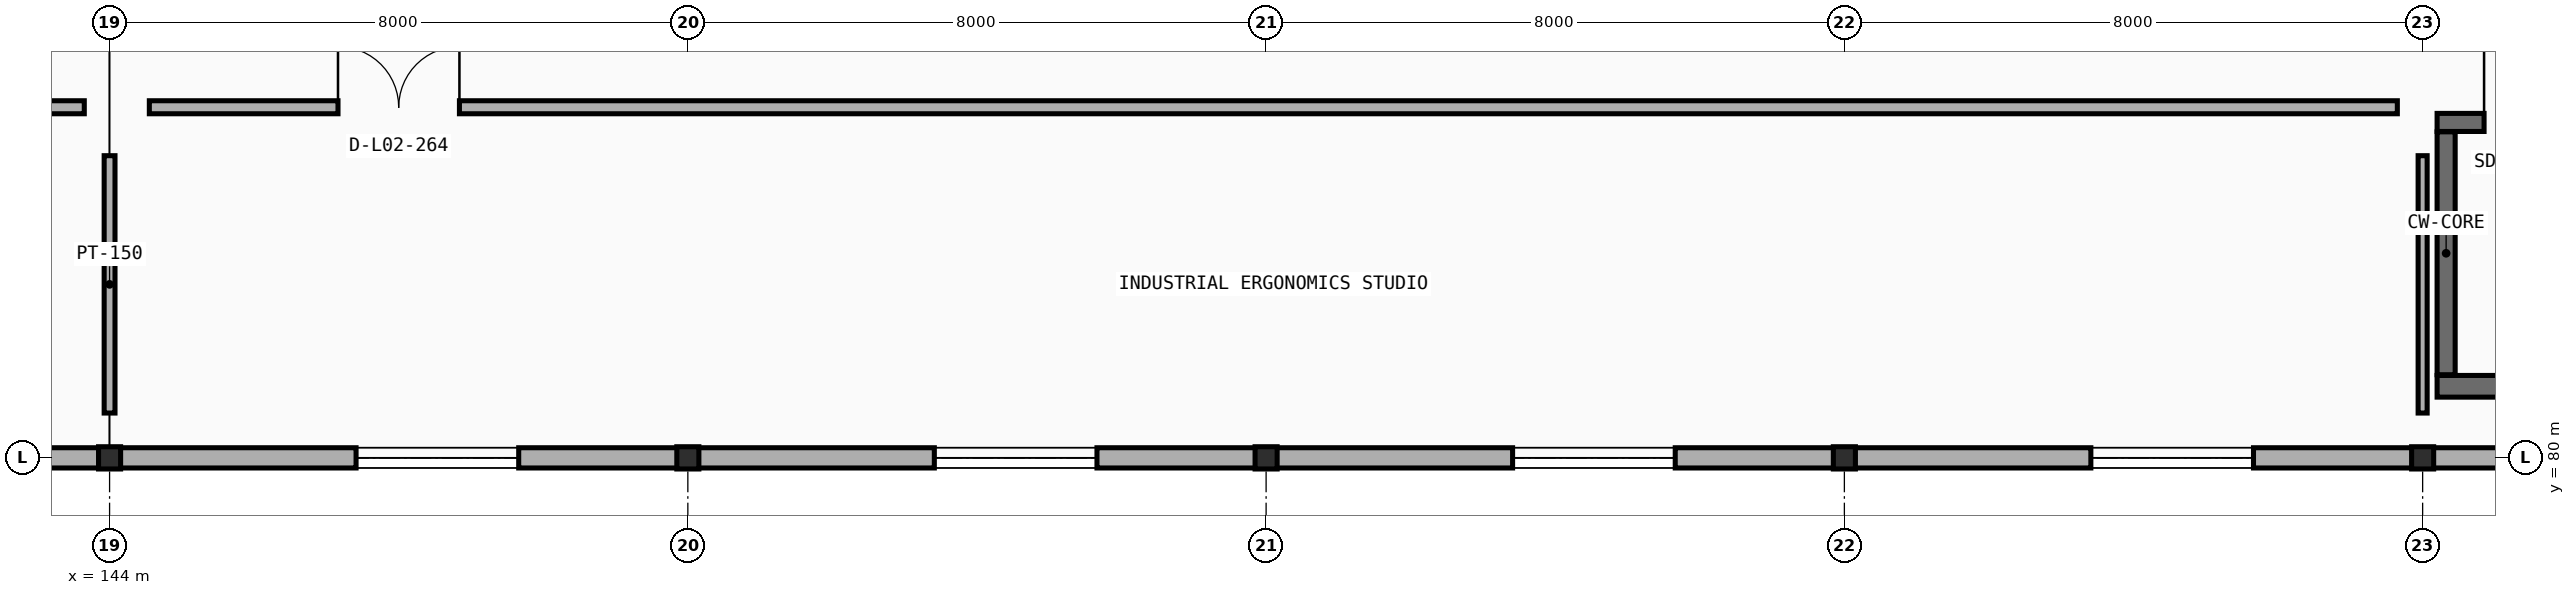
"""IFC4 building model, lengths in metres.
Left out: names, types, materials, properties, quantities, classifications, styles, units other than length and angle.
Written with IfcOpenShell. Run it as: python <this file> out.ifc"""

import sys

from ifc_helpers import new_model, si_unit, direction, frame, frame_2d, origin, origin_2d, place, context, subcontext, project, spatial, rectangle, i_section, extrude, element, fill, save


model = new_model("IFC4")
c1 = context("Model", 3, precision=1e-05, world=origin(), true_north=direction((0.0, 1.0)))
c2 = subcontext(c1, "Body", "Model", "MODEL_VIEW")
j1 = project(units=[si_unit("LENGTHUNIT", "METRE"), si_unit("PLANEANGLEUNIT", "RADIAN")], contexts=[c1])
p1 = place(None, origin())
s1 = spatial("IfcSite", under=j1, at=p1, CompositionType="ELEMENT")
p2 = place(p1, origin())
s2 = spatial("IfcBuilding", under=s1, at=p2, CompositionType="ELEMENT")
p3 = place(p2, frame((0.0, 0.0, 4.8)))
s3 = spatial("IfcBuildingStorey", under=s2, at=p3, CompositionType="ELEMENT", Elevation=4.8)
for number, where, z_axis, x_axis in (
    (1, (144.0, 80.0, 0.0), (0.0, 0.0, 1.0), (1.0, 0.0, 0.0)),
    (2, (152.0, 80.0, 0.0), (0.0, 0.0, 1.0), (1.0, 0.0, 0.0)),
    (3, (160.0, 80.0, 0.0), (0.0, 0.0, 1.0), (1.0, 0.0, 0.0)),
    (4, (168.0, 80.0, 0.0), (0.0, 0.0, 1.0), (1.0, 0.0, 0.0)),
    (5, (176.0, 80.0, 0.0), (0.0, 0.0, 1.0), (1.0, 0.0, 0.0)),
):
    element("IfcColumn", number, at=place(p3, frame(where, z_axis=z_axis, x_axis=x_axis)), inside=s3, PredefinedType="COLUMN", context=c2, shape_type="SweptSolid", body=[
        extrude(i_section(OverallWidth=0.305, OverallDepth=0.308, WebThickness=0.01, FlangeThickness=0.015, FilletRadius=0.015, at=origin_2d()), origin(), (0.0, 0.0, 1.0), 5.15),
    ])
p4 = place(p3, frame((143.996, 80.0, 0.0), z_axis=(0.0, 0.0, 1.0), x_axis=(-1.0, 0.0, 0.0)))
e6 = element("IfcWall", 6, at=p4, inside=s3, PredefinedType="STANDARD", context=c2, shape_type="SweptSolid", body=[
    extrude(rectangle(XDim=7.992, YDim=0.28, at=frame_2d((3.996, 0.0))), origin(), (0.0, 0.0, 1.0), 3.965),
])
p5 = place(p4, frame((2.336, 0.0, 0.95)))
e7 = element("IfcOpeningElement", 7, at=p5, cuts=e6, PredefinedType="OPENING", context=c2, shape_type="SweptSolid", body=[
    extrude(rectangle(XDim=2.25, YDim=2.0, at=frame_2d((1.125, 1.0))), frame((0.0, 0.15, 0.0), z_axis=(0.0, -1.0, 0.0), x_axis=(1.0, 0.0, 0.0)), (0.0, 0.0, 1.0), 0.3),
])
p6 = place(p3, frame((151.996, 80.0, 0.0), z_axis=(0.0, 0.0, 1.0), x_axis=(-1.0, 0.0, 0.0)))
e8 = element("IfcWall", 8, at=p6, inside=s3, PredefinedType="STANDARD", context=c2, shape_type="SweptSolid", body=[
    extrude(rectangle(XDim=7.992, YDim=0.28, at=frame_2d((3.996, 0.0))), origin(), (0.0, 0.0, 1.0), 3.965),
])
p7 = place(p6, frame((2.336, 0.0, 0.95)))
e9 = element("IfcOpeningElement", 9, at=p7, cuts=e8, PredefinedType="OPENING", context=c2, shape_type="SweptSolid", body=[
    extrude(rectangle(XDim=2.25, YDim=2.0, at=frame_2d((1.125, 1.0))), frame((0.0, 0.15, 0.0), z_axis=(0.0, -1.0, 0.0), x_axis=(1.0, 0.0, 0.0)), (0.0, 0.0, 1.0), 0.3),
])
p8 = place(p3, frame((159.996, 80.0, 0.0), z_axis=(0.0, 0.0, 1.0), x_axis=(-1.0, 0.0, 0.0)))
e10 = element("IfcWall", 10, at=p8, inside=s3, PredefinedType="STANDARD", context=c2, shape_type="SweptSolid", body=[
    extrude(rectangle(XDim=7.992, YDim=0.28, at=frame_2d((3.996, 0.0))), origin(), (0.0, 0.0, 1.0), 3.965),
])
p9 = place(p8, frame((2.336, 0.0, 0.95)))
e11 = element("IfcOpeningElement", 11, at=p9, cuts=e10, PredefinedType="OPENING", context=c2, shape_type="SweptSolid", body=[
    extrude(rectangle(XDim=2.25, YDim=2.0, at=frame_2d((1.125, 1.0))), frame((0.0, 0.15, 0.0), z_axis=(0.0, -1.0, 0.0), x_axis=(1.0, 0.0, 0.0)), (0.0, 0.0, 1.0), 0.3),
])
p10 = place(p3, frame((167.996, 80.0, 0.0), z_axis=(0.0, 0.0, 1.0), x_axis=(-1.0, 0.0, 0.0)))
e12 = element("IfcWall", 12, at=p10, inside=s3, PredefinedType="STANDARD", context=c2, shape_type="SweptSolid", body=[
    extrude(rectangle(XDim=7.992, YDim=0.28, at=frame_2d((3.996, 0.0))), origin(), (0.0, 0.0, 1.0), 3.965),
])
p11 = place(p10, frame((2.336, 0.0, 0.95)))
e13 = element("IfcOpeningElement", 13, at=p11, cuts=e12, PredefinedType="OPENING", context=c2, shape_type="SweptSolid", body=[
    extrude(rectangle(XDim=2.25, YDim=2.0, at=frame_2d((1.125, 1.0))), frame((0.0, 0.15, 0.0), z_axis=(0.0, -1.0, 0.0), x_axis=(1.0, 0.0, 0.0)), (0.0, 0.0, 1.0), 0.3),
])
p12 = place(p3, frame((175.996, 80.0, 0.0), z_axis=(0.0, 0.0, 1.0), x_axis=(-1.0, 0.0, 0.0)))
e14 = element("IfcWall", 14, at=p12, inside=s3, PredefinedType="STANDARD", context=c2, shape_type="SweptSolid", body=[
    extrude(rectangle(XDim=7.992, YDim=0.28, at=frame_2d((3.996, 0.0))), origin(), (0.0, 0.0, 1.0), 3.965),
])
p13 = place(p12, frame((2.336, 0.0, 0.95)))
e15 = element("IfcOpeningElement", 15, at=p13, cuts=e14, PredefinedType="OPENING", context=c2, shape_type="SweptSolid", body=[
    extrude(rectangle(XDim=2.25, YDim=2.0, at=frame_2d((1.125, 1.0))), frame((0.0, 0.15, 0.0), z_axis=(0.0, -1.0, 0.0), x_axis=(1.0, 0.0, 0.0)), (0.0, 0.0, 1.0), 0.3),
])
p14 = place(p3, frame((183.996, 80.0, 0.0), z_axis=(0.0, 0.0, 1.0), x_axis=(-1.0, 0.0, 0.0)))
e16 = element("IfcWall", 16, at=p14, inside=s3, PredefinedType="STANDARD", context=c2, shape_type="SweptSolid", body=[
    extrude(rectangle(XDim=7.992, YDim=0.28, at=frame_2d((3.996, 0.0))), origin(), (0.0, 0.0, 1.0), 3.965),
])
p15 = place(p14, frame((2.336, 0.0, 0.95)))
e17 = element("IfcOpeningElement", 17, at=p15, cuts=e16, PredefinedType="OPENING", context=c2, shape_type="SweptSolid", body=[
    extrude(rectangle(XDim=2.25, YDim=2.0, at=frame_2d((1.125, 1.0))), frame((0.0, 0.15, 0.0), z_axis=(0.0, -1.0, 0.0), x_axis=(1.0, 0.0, 0.0)), (0.0, 0.0, 1.0), 0.3),
])
p16 = place(p3, frame((176.2, 80.99, 0.0), z_axis=(0.0, 0.0, 1.0), x_axis=(1.0, 0.0, 0.0)))
e18 = element("IfcWall", 18, at=p16, inside=s3, PredefinedType="SHEAR", context=c2, shape_type="SweptSolid", body=[
    extrude(rectangle(XDim=7.65, YDim=0.3, at=frame_2d((3.825, 0.0))), origin(), (0.0, 0.0, 1.0), 4.8),
])
p17 = place(p3, frame((176.2, 84.64, 0.0), z_axis=(0.0, 0.0, 1.0), x_axis=(1.0, 0.0, 0.0)))
e19 = element("IfcWall", 19, at=p17, inside=s3, PredefinedType="SOLIDWALL", context=c2, shape_type="SweptSolid", body=[
    extrude(rectangle(XDim=7.65, YDim=0.25, at=frame_2d((3.825, 0.0))), origin(), (0.0, 0.0, 1.0), 4.8),
])
p18 = place(p17, frame((0.65, 0.0, 0.0)))
e20 = element("IfcOpeningElement", 20, at=p18, cuts=e19, PredefinedType="OPENING", context=c2, shape_type="SweptSolid", body=[
    extrude(rectangle(XDim=1.25, YDim=2.15, at=frame_2d((0.625, 1.075))), frame((0.0, 0.135, 0.0), z_axis=(0.0, -1.0, 0.0), x_axis=(1.0, 0.0, 0.0)), (0.0, 0.0, 1.0), 0.27),
])
p19 = place(p3, frame((176.325, 81.15, 0.0), z_axis=(0.0, 0.0, 1.0), x_axis=(0.0, 1.0, 0.0)))
e21 = element("IfcWall", 21, at=p19, inside=s3, PredefinedType="SOLIDWALL", context=c2, shape_type="SweptSolid", body=[
    extrude(rectangle(XDim=3.36, YDim=0.25, at=frame_2d((1.68, 0.0))), origin(), (0.0, 0.0, 1.0), 4.8),
])
p20 = place(p3, frame((112.35, 84.85, 0.0), z_axis=(0.0, 0.0, 1.0), x_axis=(1.0, 0.0, 0.0)))
e22 = element("IfcWall", 22, at=p20, inside=s3, PredefinedType="PARTITIONING", context=c2, shape_type="SweptSolid", body=[
    extrude(rectangle(XDim=31.3, YDim=0.18, at=frame_2d((15.65, 0.0))), origin(), (0.0, 0.0, 1.0), 3.9),
])
p21 = place(p20, frame((2.88, 0.0, 0.0)))
e23 = element("IfcOpeningElement", 23, at=p21, cuts=e22, PredefinedType="OPENING", context=c2, shape_type="SweptSolid", body=[
    extrude(rectangle(XDim=1.54, YDim=2.2, at=frame_2d((0.77, 1.1))), frame((0.0, 0.1, 0.0), z_axis=(0.0, -1.0, 0.0), x_axis=(1.0, 0.0, 0.0)), (0.0, 0.0, 1.0), 0.2),
])
p22 = place(p3, frame((144.0, 80.62, 0.0), z_axis=(0.0, 0.0, 1.0), x_axis=(0.0, 1.0, 0.0)))
e24 = element("IfcWall", 24, at=p22, inside=s3, PredefinedType="PARTITIONING", context=c2, shape_type="SweptSolid", body=[
    extrude(rectangle(XDim=3.56, YDim=0.15, at=frame_2d((1.78, 0.0))), origin(), (0.0, 0.0, 1.0), 3.815),
])
p23 = place(p3, frame((144.55, 84.85, 0.0), z_axis=(0.0, 0.0, 1.0), x_axis=(1.0, 0.0, 0.0)))
e25 = element("IfcWall", 25, at=p23, inside=s3, PredefinedType="PARTITIONING", context=c2, shape_type="SweptSolid", body=[
    extrude(rectangle(XDim=31.1, YDim=0.18, at=frame_2d((15.55, 0.0))), origin(), (0.0, 0.0, 1.0), 3.9),
])
p24 = place(p23, frame((2.61, 0.0, 0.0)))
e26 = element("IfcOpeningElement", 26, at=p24, cuts=e25, PredefinedType="OPENING", context=c2, shape_type="SweptSolid", body=[
    extrude(rectangle(XDim=1.68, YDim=2.25, at=frame_2d((0.84, 1.125))), frame((0.0, 0.1, 0.0), z_axis=(0.0, -1.0, 0.0), x_axis=(1.0, 0.0, 0.0)), (0.0, 0.0, 1.0), 0.2),
])
p25 = place(p3, frame((176.0, 80.62, 0.0), z_axis=(0.0, 0.0, 1.0), x_axis=(0.0, 1.0, 0.0)))
e27 = element("IfcWall", 27, at=p25, inside=s3, PredefinedType="PARTITIONING", context=c2, shape_type="SweptSolid", body=[
    extrude(rectangle(XDim=3.56, YDim=0.125, at=frame_2d((1.78, 0.0))), origin(), (0.0, 0.0, 1.0), 3.815),
])
p26 = place(p7, origin())
e28 = element("IfcWindow", 28, at=p26, inside=s3, PartitioningType="DOUBLE_PANEL_VERTICAL", PredefinedType="WINDOW", context=c2, shape_type="SweptSolid", body=[
    extrude(rectangle(XDim=2.25, YDim=2.0, at=frame_2d((1.125, 1.0))), frame((0.0, 0.03, 0.0), z_axis=(0.0, -1.0, 0.0), x_axis=(1.0, 0.0, 0.0)), (0.0, 0.0, 1.0), 0.06),
])
fill(e9, e28)
p27 = place(p9, origin())
e29 = element("IfcWindow", 29, at=p27, inside=s3, PartitioningType="DOUBLE_PANEL_VERTICAL", PredefinedType="WINDOW", context=c2, shape_type="SweptSolid", body=[
    extrude(rectangle(XDim=2.25, YDim=2.0, at=frame_2d((1.125, 1.0))), frame((0.0, 0.03, 0.0), z_axis=(0.0, -1.0, 0.0), x_axis=(1.0, 0.0, 0.0)), (0.0, 0.0, 1.0), 0.06),
])
fill(e11, e29)
p28 = place(p11, origin())
e30 = element("IfcWindow", 30, at=p28, inside=s3, PartitioningType="DOUBLE_PANEL_VERTICAL", PredefinedType="WINDOW", context=c2, shape_type="SweptSolid", body=[
    extrude(rectangle(XDim=2.25, YDim=2.0, at=frame_2d((1.125, 1.0))), frame((0.0, 0.03, 0.0), z_axis=(0.0, -1.0, 0.0), x_axis=(1.0, 0.0, 0.0)), (0.0, 0.0, 1.0), 0.06),
])
fill(e13, e30)
p29 = place(p13, origin())
e31 = element("IfcWindow", 31, at=p29, inside=s3, PartitioningType="DOUBLE_PANEL_VERTICAL", PredefinedType="WINDOW", context=c2, shape_type="SweptSolid", body=[
    extrude(rectangle(XDim=2.25, YDim=2.0, at=frame_2d((1.125, 1.0))), frame((0.0, 0.03, 0.0), z_axis=(0.0, -1.0, 0.0), x_axis=(1.0, 0.0, 0.0)), (0.0, 0.0, 1.0), 0.06),
])
fill(e15, e31)
p30 = place(p18, origin())
e32 = element("IfcDoor", 32, at=p30, inside=s3, OperationType="SINGLE_SWING_LEFT", PredefinedType="DOOR", context=c2, shape_type="SweptSolid", body=[
    extrude(rectangle(XDim=1.25, YDim=2.15, at=frame_2d((0.625, 1.075))), frame((0.0, 0.025, 0.0), z_axis=(0.0, -1.0, 0.0), x_axis=(1.0, 0.0, 0.0)), (0.0, 0.0, 1.0), 0.05),
])
fill(e20, e32)
p31 = place(p24, origin())
e33 = element("IfcDoor", 33, at=p31, inside=s3, OperationType="DOUBLE_DOOR_SINGLE_SWING", PredefinedType="DOOR", context=c2, shape_type="SweptSolid", body=[
    extrude(rectangle(XDim=1.68, YDim=2.25, at=frame_2d((0.84, 1.125))), frame((0.0, 0.025, 0.0), z_axis=(0.0, -1.0, 0.0), x_axis=(1.0, 0.0, 0.0)), (0.0, 0.0, 1.0), 0.05),
])
fill(e26, e33)
save(model, sys.argv[1])
